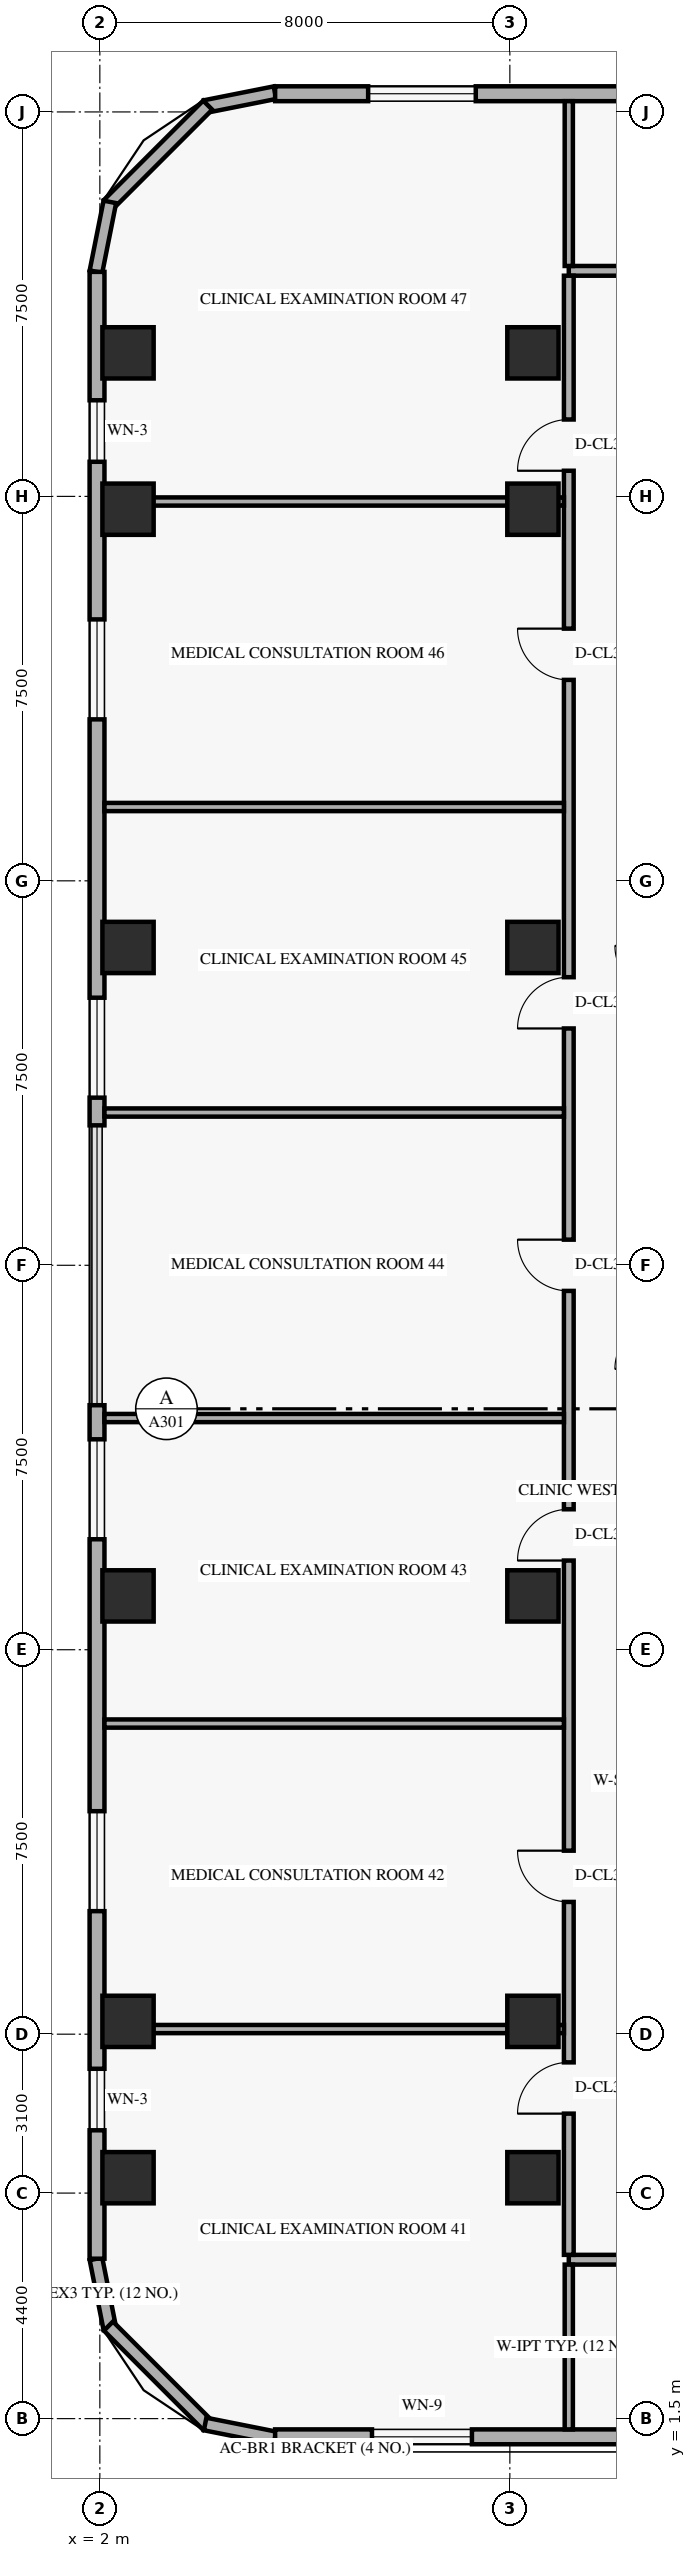
"""IFC4 building model, lengths in metres.
Left out: names, types, materials, properties, quantities, classifications, styles, units other than length and angle.
Written with IfcOpenShell. Run it as: python <this file> out.ifc"""

import sys

from ifc_helpers import new_model, si_unit, direction, frame, frame_2d, origin, origin_2d, place, context, subcontext, project, spatial, rectangle, extrude, element, fill, save


model = new_model("IFC4")
c1 = context("Model", 3, precision=1e-05, world=origin(), true_north=direction((0.0, 1.0)))
c2 = subcontext(c1, "Body", "Model", "MODEL_VIEW")
j1 = project(units=[si_unit("LENGTHUNIT", "METRE"), si_unit("PLANEANGLEUNIT", "RADIAN")], contexts=[c1])
p1 = place(None, origin())
s1 = spatial("IfcSite", under=j1, at=p1, CompositionType="ELEMENT")
p2 = place(p1, origin())
s2 = spatial("IfcBuilding", under=s1, at=p2, CompositionType="ELEMENT")
p3 = place(p2, frame((0.0, 0.0, 19.2)))
s3 = spatial("IfcBuildingStorey", under=s2, at=p3, CompositionType="ELEMENT", Elevation=19.2)
for number, where, z_axis, x_axis in (
    (1, (2.55, 6.2, 0.0), (0.0, 0.0, 1.0), (1.0, 0.0, 0.0)),
    (2, (2.55, 9.25, 0.0), (0.0, 0.0, 1.0), (1.0, 0.0, 0.0)),
    (3, (2.55, 17.55, 0.0), (0.0, 0.0, 1.0), (1.0, 0.0, 0.0)),
    (4, (2.55, 30.2, 0.0), (0.0, 0.0, 1.0), (1.0, 0.0, 0.0)),
    (5, (2.55, 38.75, 0.0), (0.0, 0.0, 1.0), (1.0, 0.0, 0.0)),
    (6, (2.55, 41.8, 0.0), (0.0, 0.0, 1.0), (1.0, 0.0, 0.0)),
):
    element("IfcColumn", number, at=place(p3, frame(where, z_axis=z_axis, x_axis=x_axis)), inside=s3, PredefinedType="COLUMN", context=c2, shape_type="SweptSolid", body=[
        extrude(rectangle(XDim=1.0, YDim=1.0, at=origin_2d()), origin(), (0.0, 0.0, 1.0), 3.0),
    ])
for number, where, z_axis, x_axis in (
    (7, (10.45, 6.2, 0.0), (0.0, 0.0, 1.0), (1.0, 0.0, 0.0)),
    (8, (10.45, 9.25, 0.0), (0.0, 0.0, 1.0), (1.0, 0.0, 0.0)),
    (9, (10.45, 17.55, 0.0), (0.0, 0.0, 1.0), (1.0, 0.0, 0.0)),
    (10, (10.45, 30.2, 0.0), (0.0, 0.0, 1.0), (1.0, 0.0, 0.0)),
    (11, (10.45, 38.75, 0.0), (0.0, 0.0, 1.0), (1.0, 0.0, 0.0)),
    (12, (10.45, 41.8, 0.0), (0.0, 0.0, 1.0), (1.0, 0.0, 0.0)),
):
    element("IfcColumn", number, at=place(p3, frame(where, z_axis=z_axis, x_axis=x_axis)), inside=s3, PredefinedType="COLUMN", context=c2, shape_type="SweptSolid", body=[
        extrude(rectangle(XDim=1.0, YDim=1.0, at=origin_2d()), origin(), (0.0, 0.0, 1.0), 4.8),
    ])
p4 = place(p3, frame((1.924, 4.616, 0.0), z_axis=(0.0, 0.0, 1.0), x_axis=(0.19496651342, -0.980809899341, 0.0)))
e13 = element("IfcWall", 13, at=p4, inside=s3, PredefinedType="SOLIDWALL", context=c2, shape_type="SweptSolid", body=[
    extrude(rectangle(XDim=1.389, YDim=0.25, at=frame_2d((0.694, 0.0))), origin(), (0.0, 0.0, 1.0), 4.5),
])
p5 = place(p3, frame((2.168, 3.305, 0.0), z_axis=(0.0, 0.0, 1.0), x_axis=(0.707106781187, -0.707106781187, 0.0)))
e14 = element("IfcWall", 14, at=p5, inside=s3, PredefinedType="SOLIDWALL", context=c2, shape_type="SweptSolid", body=[
    extrude(rectangle(XDim=2.739, YDim=0.25, at=frame_2d((1.37, 0.0))), origin(), (0.0, 0.0, 1.0), 4.5),
])
for number, where, z_axis, x_axis in (
    (15, (4.054, 1.395, 0.0), (0.0, 0.0, 1.0), (0.981, -0.195, 0.0)),
    (16, (5.417, 46.876, 0.0), (0.0, 0.0, 1.0), (-0.981, -0.195, 0.0)),
):
    element("IfcWall", number, at=place(p3, frame(where, z_axis=z_axis, x_axis=x_axis)), inside=s3, PredefinedType="SOLIDWALL", context=c2, shape_type="SweptSolid", body=[
        extrude(rectangle(XDim=1.389, YDim=0.25, at=frame_2d((0.694, 0.0))), origin(), (0.0, 0.0, 1.0), 4.5),
    ])
p6 = place(p3, frame((4.105, 46.632, 0.0), z_axis=(0.0, 0.0, 1.0), x_axis=(-0.707106781187, -0.707106781187, 0.0)))
e17 = element("IfcWall", 17, at=p6, inside=s3, PredefinedType="SOLIDWALL", context=c2, shape_type="SweptSolid", body=[
    extrude(rectangle(XDim=2.739, YDim=0.25, at=frame_2d((1.37, 0.0))), origin(), (0.0, 0.0, 1.0), 4.5),
])
p7 = place(p3, frame((2.195, 44.746, 0.0), z_axis=(0.0, 0.0, 1.0), x_axis=(-0.19496651342, -0.980809899341, 0.0)))
e18 = element("IfcWall", 18, at=p7, inside=s3, PredefinedType="SOLIDWALL", context=c2, shape_type="SweptSolid", body=[
    extrude(rectangle(XDim=1.389, YDim=0.25, at=frame_2d((0.694, 0.0))), origin(), (0.0, 0.0, 1.0), 4.5),
])
p8 = place(p3, frame((5.42, 1.145, 0.0), z_axis=(0.0, 0.0, 1.0), x_axis=(1.0, 0.0, 0.0)))
e19 = element("IfcWall", 19, at=p8, inside=s3, PredefinedType="SOLIDWALL", context=c2, shape_type="SweptSolid", body=[
    extrude(rectangle(XDim=19.58, YDim=0.29, at=frame_2d((9.79, 0.0))), origin(), (0.0, 0.0, 1.0), 4.5),
])
p9 = place(p8, frame((1.89, 0.0, 0.85)))
e20 = element("IfcOpeningElement", 20, at=p9, cuts=e19, PredefinedType="OPENING", context=c2, shape_type="SweptSolid", body=[
    extrude(rectangle(XDim=1.95, YDim=1.75, at=frame_2d((0.975, 0.875))), frame((0.0, 0.155, 0.0), z_axis=(0.0, -1.0, 0.0), x_axis=(1.0, 0.0, 0.0)), (0.0, 0.0, 1.0), 0.31),
])
p10 = place(p8, frame((11.68, 0.0, 0.85)))
e21 = element("IfcOpeningElement", 21, at=p10, cuts=e19, PredefinedType="OPENING", context=c2, shape_type="SweptSolid", body=[
    extrude(rectangle(XDim=1.95, YDim=1.75, at=frame_2d((0.975, 0.875))), frame((0.0, 0.155, 0.0), z_axis=(0.0, -1.0, 0.0), x_axis=(1.0, 0.0, 0.0)), (0.0, 0.0, 1.0), 0.31),
])
p11 = place(p3, frame((44.98, 46.855, 0.0), z_axis=(0.0, 0.0, 1.0), x_axis=(-1.0, 0.0, 0.0)))
e22 = element("IfcWall", 22, at=p11, inside=s3, PredefinedType="SOLIDWALL", context=c2, shape_type="SweptSolid", body=[
    extrude(rectangle(XDim=39.56, YDim=0.29, at=frame_2d((19.78, 0.0))), origin(), (0.0, 0.0, 1.0), 4.5),
])
p12 = place(p11, frame((35.645, 0.0, 0.85)))
e23 = element("IfcOpeningElement", 23, at=p12, cuts=e22, PredefinedType="OPENING", context=c2, shape_type="SweptSolid", body=[
    extrude(rectangle(XDim=2.1, YDim=1.75, at=frame_2d((1.05, 0.875))), frame((0.0, 0.155, 0.0), z_axis=(0.0, -1.0, 0.0), x_axis=(1.0, 0.0, 0.0)), (0.0, 0.0, 1.0), 0.31),
])
p13 = place(p11, frame((19.58, 0.0, 0.85)))
e24 = element("IfcOpeningElement", 24, at=p13, cuts=e22, PredefinedType="OPENING", context=c2, shape_type="SweptSolid", body=[
    extrude(rectangle(XDim=2.1, YDim=1.75, at=frame_2d((1.05, 0.875))), frame((0.0, 0.155, 0.0), z_axis=(0.0, -1.0, 0.0), x_axis=(1.0, 0.0, 0.0)), (0.0, 0.0, 1.0), 0.31),
])
p14 = place(p11, frame((2.665, 0.0, 0.85)))
e25 = element("IfcOpeningElement", 25, at=p14, cuts=e22, PredefinedType="OPENING", context=c2, shape_type="SweptSolid", body=[
    extrude(rectangle(XDim=2.1, YDim=1.75, at=frame_2d((1.05, 0.875))), frame((0.0, 0.155, 0.0), z_axis=(0.0, -1.0, 0.0), x_axis=(1.0, 0.0, 0.0)), (0.0, 0.0, 1.0), 0.31),
])
p15 = place(p3, frame((1.945, 43.38, 0.0), z_axis=(0.0, 0.0, 1.0), x_axis=(0.0, -1.0, 0.0)))
e26 = element("IfcWall", 26, at=p15, inside=s3, PredefinedType="SOLIDWALL", context=c2, shape_type="SweptSolid", body=[
    extrude(rectangle(XDim=16.65, YDim=0.29, at=frame_2d((8.325, 0.0))), origin(), (0.0, 0.0, 1.0), 2.982),
])
p16 = place(p15, frame((14.16, 0.0, 0.85)))
e27 = element("IfcOpeningElement", 27, at=p16, cuts=e26, PredefinedType="OPENING", context=c2, shape_type="SweptSolid", body=[
    extrude(rectangle(XDim=1.95, YDim=1.75, at=frame_2d((0.975, 0.875))), frame((0.0, 0.155, 0.0), z_axis=(0.0, -1.0, 0.0), x_axis=(1.0, 0.0, 0.0)), (0.0, 0.0, 1.0), 0.31),
])
p17 = place(p15, frame((6.78, 0.0, 0.85)))
e28 = element("IfcOpeningElement", 28, at=p17, cuts=e26, PredefinedType="OPENING", context=c2, shape_type="SweptSolid", body=[
    extrude(rectangle(XDim=1.95, YDim=1.75, at=frame_2d((0.975, 0.875))), frame((0.0, 0.155, 0.0), z_axis=(0.0, -1.0, 0.0), x_axis=(1.0, 0.0, 0.0)), (0.0, 0.0, 1.0), 0.31),
])
p18 = place(p15, frame((2.505, 0.0, 0.85)))
e29 = element("IfcOpeningElement", 29, at=p18, cuts=e26, PredefinedType="OPENING", context=c2, shape_type="SweptSolid", body=[
    extrude(rectangle(XDim=1.2, YDim=1.5, at=frame_2d((0.6, 0.75))), frame((0.0, 0.155, 0.0), z_axis=(0.0, -1.0, 0.0), x_axis=(1.0, 0.0, 0.0)), (0.0, 0.0, 1.0), 0.31),
])
p19 = place(p3, frame((1.945, 21.27, 0.0), z_axis=(0.0, 0.0, 1.0), x_axis=(0.0, -1.0, 0.0)))
e30 = element("IfcWall", 30, at=p19, inside=s3, PredefinedType="SOLIDWALL", context=c2, shape_type="SweptSolid", body=[
    extrude(rectangle(XDim=16.65, YDim=0.29, at=frame_2d((8.325, 0.0))), origin(), (0.0, 0.0, 1.0), 2.982),
])
p20 = place(p19, frame((12.945, 0.0, 0.85)))
e31 = element("IfcOpeningElement", 31, at=p20, cuts=e30, PredefinedType="OPENING", context=c2, shape_type="SweptSolid", body=[
    extrude(rectangle(XDim=1.2, YDim=1.5, at=frame_2d((0.6, 0.75))), frame((0.0, 0.155, 0.0), z_axis=(0.0, -1.0, 0.0), x_axis=(1.0, 0.0, 0.0)), (0.0, 0.0, 1.0), 0.31),
])
p21 = place(p19, frame((7.92, 0.0, 0.85)))
e32 = element("IfcOpeningElement", 32, at=p21, cuts=e30, PredefinedType="OPENING", context=c2, shape_type="SweptSolid", body=[
    extrude(rectangle(XDim=1.95, YDim=1.75, at=frame_2d((0.975, 0.875))), frame((0.0, 0.155, 0.0), z_axis=(0.0, -1.0, 0.0), x_axis=(1.0, 0.0, 0.0)), (0.0, 0.0, 1.0), 0.31),
])
p22 = place(p19, frame((0.665, 0.0, 0.85)))
e33 = element("IfcOpeningElement", 33, at=p22, cuts=e30, PredefinedType="OPENING", context=c2, shape_type="SweptSolid", body=[
    extrude(rectangle(XDim=1.95, YDim=1.75, at=frame_2d((0.975, 0.875))), frame((0.0, 0.155, 0.0), z_axis=(0.0, -1.0, 0.0), x_axis=(1.0, 0.0, 0.0)), (0.0, 0.0, 1.0), 0.31),
])
for number, where, z_axis, x_axis in (
    (34, (11.15, 4.6, 0.0), (0.0, 0.0, 1.0), (1.0, 0.0, 0.0)),
    (35, (11.15, 43.4, 0.0), (0.0, 0.0, 1.0), (1.0, 0.0, 0.0)),
):
    element("IfcWall", number, at=place(p3, frame(where, z_axis=z_axis, x_axis=x_axis)), inside=s3, PredefinedType="STANDARD", context=c2, shape_type="SweptSolid", body=[
        extrude(rectangle(XDim=1.85, YDim=0.19, at=frame_2d((0.925, 0.0))), origin(), (0.0, 0.0, 1.0), 4.5),
    ])
p23 = place(p3, frame((11.15, 4.695, 0.0), z_axis=(0.0, 0.0, 1.0), x_axis=(0.0, 1.0, 0.0)))
e36 = element("IfcWall", 36, at=p23, inside=s3, PredefinedType="STANDARD", context=c2, shape_type="SweptSolid", body=[
    extrude(rectangle(XDim=38.61, YDim=0.19, at=frame_2d((19.305, 0.0))), origin(), (0.0, 0.0, 1.0), 3.555),
])
p24 = place(p23, frame((2.755, 0.0, 0.0)))
e37 = element("IfcOpeningElement", 37, at=p24, cuts=e36, PredefinedType="OPENING", context=c2, shape_type="SweptSolid", body=[
    extrude(rectangle(XDim=1.0, YDim=2.15, at=frame_2d((0.5, 1.075))), frame((0.0, 0.105, 0.0), z_axis=(0.0, -1.0, 0.0), x_axis=(1.0, 0.0, 0.0)), (0.0, 0.0, 1.0), 0.21),
])
p25 = place(p23, frame((6.885, 0.0, 0.0)))
e38 = element("IfcOpeningElement", 38, at=p25, cuts=e36, PredefinedType="OPENING", context=c2, shape_type="SweptSolid", body=[
    extrude(rectangle(XDim=1.0, YDim=2.15, at=frame_2d((0.5, 1.075))), frame((0.0, 0.105, 0.0), z_axis=(0.0, -1.0, 0.0), x_axis=(1.0, 0.0, 0.0)), (0.0, 0.0, 1.0), 0.21),
])
p26 = place(p23, frame((13.545, 0.0, 0.0)))
e39 = element("IfcOpeningElement", 39, at=p26, cuts=e36, PredefinedType="OPENING", context=c2, shape_type="SweptSolid", body=[
    extrude(rectangle(XDim=1.0, YDim=2.15, at=frame_2d((0.5, 1.075))), frame((0.0, 0.105, 0.0), z_axis=(0.0, -1.0, 0.0), x_axis=(1.0, 0.0, 0.0)), (0.0, 0.0, 1.0), 0.21),
])
p27 = place(p23, frame((18.805, 0.0, 0.0)))
e40 = element("IfcOpeningElement", 40, at=p27, cuts=e36, PredefinedType="OPENING", context=c2, shape_type="SweptSolid", body=[
    extrude(rectangle(XDim=1.0, YDim=2.15, at=frame_2d((0.5, 1.075))), frame((0.0, 0.105, 0.0), z_axis=(0.0, -1.0, 0.0), x_axis=(1.0, 0.0, 0.0)), (0.0, 0.0, 1.0), 0.21),
])
p28 = place(p23, frame((23.925, 0.0, 0.0)))
e41 = element("IfcOpeningElement", 41, at=p28, cuts=e36, PredefinedType="OPENING", context=c2, shape_type="SweptSolid", body=[
    extrude(rectangle(XDim=1.0, YDim=2.15, at=frame_2d((0.5, 1.075))), frame((0.0, 0.105, 0.0), z_axis=(0.0, -1.0, 0.0), x_axis=(1.0, 0.0, 0.0)), (0.0, 0.0, 1.0), 0.21),
])
p29 = place(p23, frame((30.725, 0.0, 0.0)))
e42 = element("IfcOpeningElement", 42, at=p29, cuts=e36, PredefinedType="OPENING", context=c2, shape_type="SweptSolid", body=[
    extrude(rectangle(XDim=1.0, YDim=2.15, at=frame_2d((0.5, 1.075))), frame((0.0, 0.105, 0.0), z_axis=(0.0, -1.0, 0.0), x_axis=(1.0, 0.0, 0.0)), (0.0, 0.0, 1.0), 0.21),
])
p30 = place(p23, frame((34.805, 0.0, 0.0)))
e43 = element("IfcOpeningElement", 43, at=p30, cuts=e36, PredefinedType="OPENING", context=c2, shape_type="SweptSolid", body=[
    extrude(rectangle(XDim=1.0, YDim=2.15, at=frame_2d((0.5, 1.075))), frame((0.0, 0.105, 0.0), z_axis=(0.0, -1.0, 0.0), x_axis=(1.0, 0.0, 0.0)), (0.0, 0.0, 1.0), 0.21),
])
for number, where, z_axis, x_axis in (
    (44, (11.15, 1.29, 0.0), (0.0, 0.0, 1.0), (0.0, 1.0, 0.0)),
    (45, (11.15, 43.495, 0.0), (0.0, 0.0, 1.0), (0.0, 1.0, 0.0)),
):
    element("IfcWall", number, at=place(p3, frame(where, z_axis=z_axis, x_axis=x_axis)), inside=s3, PredefinedType="PARTITIONING", context=c2, shape_type="SweptSolid", body=[
        extrude(rectangle(XDim=3.215, YDim=0.16, at=frame_2d((1.607, 0.0))), origin(), (0.0, 0.0, 1.0), 4.5),
    ])
p31 = place(p3, frame((2.09, 9.1, 0.0), z_axis=(0.0, 0.0, 1.0), x_axis=(1.0, 0.0, 0.0)))
e46 = element("IfcWall", 46, at=p31, inside=s3, PredefinedType="PARTITIONING", context=c2, shape_type="SweptSolid", body=[
    extrude(rectangle(XDim=8.965, YDim=0.16, at=frame_2d((4.482, 0.0))), origin(), (0.0, 0.0, 1.0), 2.982),
])
for number, where, z_axis, x_axis in (
    (47, (2.09, 15.06, 0.0), (0.0, 0.0, 1.0), (1.0, 0.0, 0.0)),
    (48, (2.09, 21.02, 0.0), (0.0, 0.0, 1.0), (1.0, 0.0, 0.0)),
    (49, (2.09, 26.98, 0.0), (0.0, 0.0, 1.0), (1.0, 0.0, 0.0)),
    (50, (2.09, 32.94, 0.0), (0.0, 0.0, 1.0), (1.0, 0.0, 0.0)),
):
    element("IfcWall", number, at=place(p3, frame(where, z_axis=z_axis, x_axis=x_axis)), inside=s3, PredefinedType="PARTITIONING", context=c2, shape_type="SweptSolid", body=[
        extrude(rectangle(XDim=8.965, YDim=0.16, at=frame_2d((4.482, 0.0))), origin(), (0.0, 0.0, 1.0), 3.132),
    ])
p32 = place(p3, frame((2.09, 38.9, 0.0), z_axis=(0.0, 0.0, 1.0), x_axis=(1.0, 0.0, 0.0)))
e51 = element("IfcWall", 51, at=p32, inside=s3, PredefinedType="PARTITIONING", context=c2, shape_type="SweptSolid", body=[
    extrude(rectangle(XDim=8.965, YDim=0.16, at=frame_2d((4.482, 0.0))), origin(), (0.0, 0.0, 1.0), 2.982),
])
p33 = place(p9, origin())
e52 = element("IfcWindow", 52, at=p33, inside=s3, PartitioningType="SINGLE_PANEL", PredefinedType="WINDOW", context=c2, shape_type="SweptSolid", body=[
    extrude(rectangle(XDim=1.95, YDim=1.75, at=frame_2d((0.975, 0.875))), frame((0.0, 0.03, 0.0), z_axis=(0.0, -1.0, 0.0), x_axis=(1.0, 0.0, 0.0)), (0.0, 0.0, 1.0), 0.06),
])
fill(e20, e52)
p34 = place(p12, origin())
e53 = element("IfcWindow", 53, at=p34, inside=s3, PartitioningType="SINGLE_PANEL", PredefinedType="WINDOW", context=c2, shape_type="SweptSolid", body=[
    extrude(rectangle(XDim=2.1, YDim=1.75, at=frame_2d((1.05, 0.875))), frame((0.0, 0.03, 0.0), z_axis=(0.0, -1.0, 0.0), x_axis=(1.0, 0.0, 0.0)), (0.0, 0.0, 1.0), 0.06),
])
fill(e23, e53)
p35 = place(p16, origin())
e54 = element("IfcWindow", 54, at=p35, inside=s3, PartitioningType="SINGLE_PANEL", PredefinedType="WINDOW", context=c2, shape_type="SweptSolid", body=[
    extrude(rectangle(XDim=1.95, YDim=1.75, at=frame_2d((0.975, 0.875))), frame((0.0, 0.03, 0.0), z_axis=(0.0, -1.0, 0.0), x_axis=(1.0, 0.0, 0.0)), (0.0, 0.0, 1.0), 0.06),
])
fill(e27, e54)
p36 = place(p17, origin())
e55 = element("IfcWindow", 55, at=p36, inside=s3, PartitioningType="SINGLE_PANEL", PredefinedType="WINDOW", context=c2, shape_type="SweptSolid", body=[
    extrude(rectangle(XDim=1.95, YDim=1.75, at=frame_2d((0.975, 0.875))), frame((0.0, 0.03, 0.0), z_axis=(0.0, -1.0, 0.0), x_axis=(1.0, 0.0, 0.0)), (0.0, 0.0, 1.0), 0.06),
])
fill(e28, e55)
p37 = place(p18, origin())
e56 = element("IfcWindow", 56, at=p37, inside=s3, PartitioningType="SINGLE_PANEL", PredefinedType="WINDOW", context=c2, shape_type="SweptSolid", body=[
    extrude(rectangle(XDim=1.2, YDim=1.5, at=frame_2d((0.6, 0.75))), frame((0.0, 0.03, 0.0), z_axis=(0.0, -1.0, 0.0), x_axis=(1.0, 0.0, 0.0)), (0.0, 0.0, 1.0), 0.06),
])
fill(e29, e56)
p38 = place(p20, origin())
e57 = element("IfcWindow", 57, at=p38, inside=s3, PartitioningType="SINGLE_PANEL", PredefinedType="WINDOW", context=c2, shape_type="SweptSolid", body=[
    extrude(rectangle(XDim=1.2, YDim=1.5, at=frame_2d((0.6, 0.75))), frame((0.0, 0.03, 0.0), z_axis=(0.0, -1.0, 0.0), x_axis=(1.0, 0.0, 0.0)), (0.0, 0.0, 1.0), 0.06),
])
fill(e31, e57)
p39 = place(p21, origin())
e58 = element("IfcWindow", 58, at=p39, inside=s3, PartitioningType="SINGLE_PANEL", PredefinedType="WINDOW", context=c2, shape_type="SweptSolid", body=[
    extrude(rectangle(XDim=1.95, YDim=1.75, at=frame_2d((0.975, 0.875))), frame((0.0, 0.03, 0.0), z_axis=(0.0, -1.0, 0.0), x_axis=(1.0, 0.0, 0.0)), (0.0, 0.0, 1.0), 0.06),
])
fill(e32, e58)
p40 = place(p22, origin())
e59 = element("IfcWindow", 59, at=p40, inside=s3, PartitioningType="SINGLE_PANEL", PredefinedType="WINDOW", context=c2, shape_type="SweptSolid", body=[
    extrude(rectangle(XDim=1.95, YDim=1.75, at=frame_2d((0.975, 0.875))), frame((0.0, 0.03, 0.0), z_axis=(0.0, -1.0, 0.0), x_axis=(1.0, 0.0, 0.0)), (0.0, 0.0, 1.0), 0.06),
])
fill(e33, e59)
p41 = place(p24, origin())
e60 = element("IfcDoor", 60, at=p41, inside=s3, OperationType="SINGLE_SWING_LEFT", PredefinedType="DOOR", context=c2, shape_type="SweptSolid", body=[
    extrude(rectangle(XDim=1.0, YDim=2.15, at=frame_2d((0.5, 1.075))), frame((0.0, 0.025, 0.0), z_axis=(0.0, -1.0, 0.0), x_axis=(1.0, 0.0, 0.0)), (0.0, 0.0, 1.0), 0.05),
])
fill(e37, e60)
p42 = place(p25, origin())
e61 = element("IfcDoor", 61, at=p42, inside=s3, OperationType="SINGLE_SWING_RIGHT", PredefinedType="DOOR", context=c2, shape_type="SweptSolid", body=[
    extrude(rectangle(XDim=1.0, YDim=2.15, at=frame_2d((0.5, 1.075))), frame((0.0, 0.025, 0.0), z_axis=(0.0, -1.0, 0.0), x_axis=(1.0, 0.0, 0.0)), (0.0, 0.0, 1.0), 0.05),
])
fill(e38, e61)
p43 = place(p26, origin())
e62 = element("IfcDoor", 62, at=p43, inside=s3, OperationType="SINGLE_SWING_LEFT", PredefinedType="DOOR", context=c2, shape_type="SweptSolid", body=[
    extrude(rectangle(XDim=1.0, YDim=2.15, at=frame_2d((0.5, 1.075))), frame((0.0, 0.025, 0.0), z_axis=(0.0, -1.0, 0.0), x_axis=(1.0, 0.0, 0.0)), (0.0, 0.0, 1.0), 0.05),
])
fill(e39, e62)
p44 = place(p27, origin())
e63 = element("IfcDoor", 63, at=p44, inside=s3, OperationType="SINGLE_SWING_RIGHT", PredefinedType="DOOR", context=c2, shape_type="SweptSolid", body=[
    extrude(rectangle(XDim=1.0, YDim=2.15, at=frame_2d((0.5, 1.075))), frame((0.0, 0.025, 0.0), z_axis=(0.0, -1.0, 0.0), x_axis=(1.0, 0.0, 0.0)), (0.0, 0.0, 1.0), 0.05),
])
fill(e40, e63)
p45 = place(p28, origin())
e64 = element("IfcDoor", 64, at=p45, inside=s3, OperationType="SINGLE_SWING_LEFT", PredefinedType="DOOR", context=c2, shape_type="SweptSolid", body=[
    extrude(rectangle(XDim=1.0, YDim=2.15, at=frame_2d((0.5, 1.075))), frame((0.0, 0.025, 0.0), z_axis=(0.0, -1.0, 0.0), x_axis=(1.0, 0.0, 0.0)), (0.0, 0.0, 1.0), 0.05),
])
fill(e41, e64)
p46 = place(p29, origin())
e65 = element("IfcDoor", 65, at=p46, inside=s3, OperationType="SINGLE_SWING_RIGHT", PredefinedType="DOOR", context=c2, shape_type="SweptSolid", body=[
    extrude(rectangle(XDim=1.0, YDim=2.15, at=frame_2d((0.5, 1.075))), frame((0.0, 0.025, 0.0), z_axis=(0.0, -1.0, 0.0), x_axis=(1.0, 0.0, 0.0)), (0.0, 0.0, 1.0), 0.05),
])
fill(e42, e65)
p47 = place(p30, origin())
e66 = element("IfcDoor", 66, at=p47, inside=s3, OperationType="SINGLE_SWING_LEFT", PredefinedType="DOOR", context=c2, shape_type="SweptSolid", body=[
    extrude(rectangle(XDim=1.0, YDim=2.15, at=frame_2d((0.5, 1.075))), frame((0.0, 0.025, 0.0), z_axis=(0.0, -1.0, 0.0), x_axis=(1.0, 0.0, 0.0)), (0.0, 0.0, 1.0), 0.05),
])
fill(e43, e66)
save(model, sys.argv[1])
